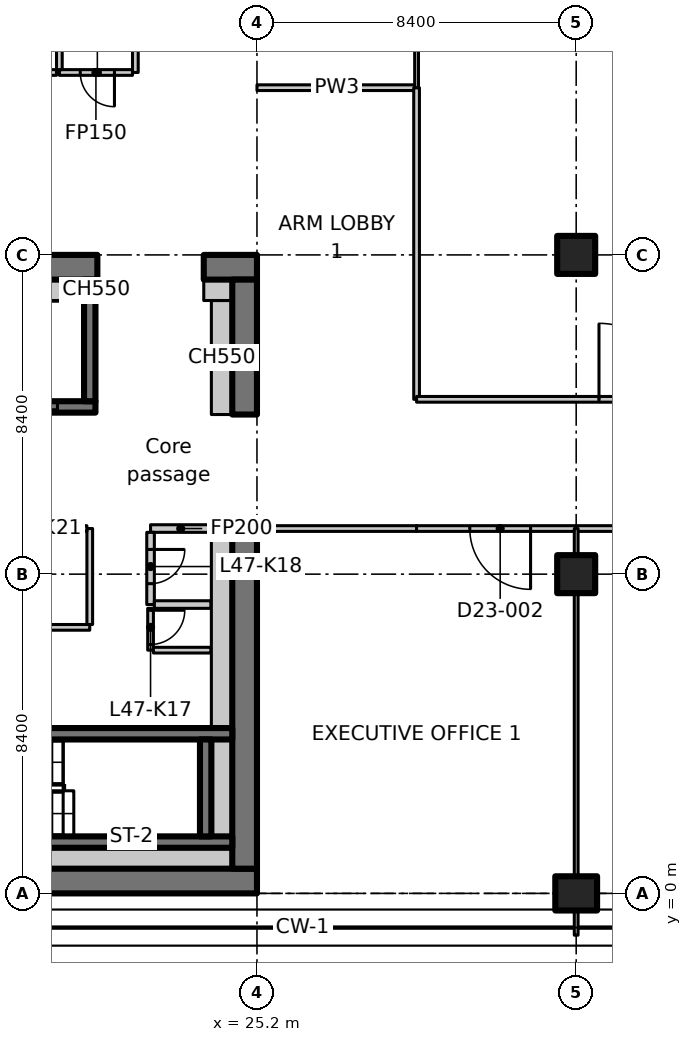
"""IFC4 building model, lengths in metres.
Left out: names, types, materials, properties, quantities, classifications, styles, units other than length and angle.
Written with IfcOpenShell. Run it as: python <this file> out.ifc"""

import sys

from ifc_helpers import new_model, si_unit, direction, frame, frame_2d, origin, origin_2d, place, context, subcontext, project, spatial, polyline, rectangle, outline, extrude, element, fill, save


model = new_model("IFC4")
c1 = context("Model", 3, precision=1e-05, world=origin(), true_north=direction((0.0, 1.0)))
c2 = subcontext(c1, "Body", "Model", "MODEL_VIEW")
j1 = project(units=[si_unit("LENGTHUNIT", "METRE"), si_unit("PLANEANGLEUNIT", "RADIAN")], contexts=[c1])
p1 = place(None, origin())
s1 = spatial("IfcSite", under=j1, at=p1, CompositionType="ELEMENT")
p2 = place(p1, origin())
s2 = spatial("IfcBuilding", under=s1, at=p2, CompositionType="ELEMENT")
p3 = place(p2, frame((0.0, 0.0, 188.4)))
s3 = spatial("IfcBuildingStorey", under=s2, at=p3, CompositionType="ELEMENT", Elevation=188.4)
p4 = place(p3, frame((33.6, 0.0, 0.0), z_axis=(0.0, 0.0, 1.0), x_axis=(0.0, 1.0, 0.0)))
e1 = element("IfcColumn", 1, at=p4, inside=s3, PredefinedType="COLUMN", context=c2, shape_type="SweptSolid", body=[
    extrude(rectangle(XDim=0.9, YDim=1.1, at=origin_2d()), origin(), (0.0, 0.0, 1.0), 3.35),
])
for number, where, z_axis, x_axis in (
    (2, (33.6, 8.4, 0.0), (0.0, 0.0, 1.0), (1.0, 0.0, 0.0)),
    (3, (33.6, 16.8, 0.0), (0.0, 0.0, 1.0), (1.0, 0.0, 0.0)),
):
    element("IfcColumn", number, at=place(p3, frame(where, z_axis=z_axis, x_axis=x_axis)), inside=s3, PredefinedType="COLUMN", context=c2, shape_type="SweptSolid", body=[
        extrude(rectangle(XDim=1.0, YDim=1.0, at=origin_2d()), origin(), (0.0, 0.0, 1.0), 3.35),
    ])
p5 = place(p3, frame((7.286, 0.325, 0.0), z_axis=(0.0, 0.0, 1.0), x_axis=(1.0, 0.0, 0.0)))
e4 = element("IfcWall", 4, at=p5, inside=s3, PredefinedType="SHEAR", context=c2, shape_type="SweptSolid", body=[
    extrude(rectangle(XDim=17.914, YDim=0.65, at=frame_2d((8.957, 0.0))), origin(), (0.0, 0.0, 1.0), 3.35),
])
p6 = place(p3, frame((-1.1, 16.475, 0.0), z_axis=(0.0, 0.0, 1.0), x_axis=(1.0, 0.0, 0.0)))
e5 = element("IfcWall", 5, at=p6, inside=s3, PredefinedType="SHEAR", context=c2, shape_type="SweptSolid", body=[
    extrude(rectangle(XDim=22.1, YDim=0.65, at=frame_2d((11.05, 0.0))), origin(), (0.0, 0.0, 1.0), 3.35),
])
p7 = place(p6, frame((3.15, 0.0, 0.0)))
e6 = element("IfcOpeningElement", 6, at=p7, cuts=e5, PredefinedType="OPENING", context=c2, shape_type="SweptSolid", body=[
    extrude(rectangle(XDim=1.1, YDim=2.3, at=frame_2d((0.55, 1.15))), frame((0.0, 0.335, 0.0), z_axis=(0.0, -1.0, 0.0), x_axis=(1.0, 0.0, 0.0)), (0.0, 0.0, 1.0), 0.67),
])
p8 = place(p3, frame((23.8, 16.475, 0.0), z_axis=(0.0, 0.0, 1.0), x_axis=(1.0, 0.0, 0.0)))
e7 = element("IfcWall", 7, at=p8, inside=s3, PredefinedType="SHEAR", context=c2, shape_type="SweptSolid", body=[
    extrude(rectangle(XDim=1.4, YDim=0.65, at=frame_2d((0.7, 0.0))), origin(), (0.0, 0.0, 1.0), 3.35),
])
p9 = place(p3, frame((24.875, 0.65, 0.0), z_axis=(0.0, 0.0, 1.0), x_axis=(0.0, 1.0, 0.0)))
e8 = element("IfcWall", 8, at=p9, inside=s3, PredefinedType="SHEAR", context=c2, shape_type="SweptSolid", body=[
    extrude(rectangle(XDim=9.15, YDim=0.65, at=frame_2d((4.575, 0.0))), origin(), (0.0, 0.0, 1.0), 3.35),
])
p10 = place(p3, frame((24.875, 12.6, 0.0), z_axis=(0.0, 0.0, 1.0), x_axis=(0.0, 1.0, 0.0)))
e9 = element("IfcWall", 9, at=p10, inside=s3, PredefinedType="SHEAR", context=c2, shape_type="SweptSolid", body=[
    extrude(rectangle(XDim=3.55, YDim=0.65, at=frame_2d((1.775, 0.0))), origin(), (0.0, 0.0, 1.0), 3.35),
])
p11 = place(p3, frame((24.275, 12.6, 0.0), z_axis=(0.0, 0.0, 1.0), x_axis=(0.0, 1.0, 0.0)))
e10 = element("IfcWall", 10, at=p11, inside=s3, PredefinedType="PARTITIONING", context=c2, shape_type="SweptSolid", body=[
    extrude(rectangle(XDim=3.0, YDim=0.55, at=frame_2d((1.5, 0.0))), origin(), (0.0, 0.0, 1.0), 3.35),
])
p12 = place(p3, frame((23.8, 15.875, 0.0), z_axis=(0.0, 0.0, 1.0), x_axis=(1.0, 0.0, 0.0)))
e11 = element("IfcWall", 11, at=p12, inside=s3, PredefinedType="PARTITIONING", context=c2, shape_type="SweptSolid", body=[
    extrude(rectangle(XDim=0.75, YDim=0.55, at=frame_2d((0.375, 0.0))), origin(), (0.0, 0.0, 1.0), 3.35),
])
p13 = place(p3, frame((17.85, 12.8, 0.0), z_axis=(0.0, 0.0, 1.0), x_axis=(1.0, 0.0, 0.0)))
e12 = element("IfcWall", 12, at=p13, inside=s3, PredefinedType="SHEAR", context=c2, shape_type="SweptSolid", body=[
    extrude(rectangle(XDim=3.1, YDim=0.3, at=frame_2d((1.55, 0.0))), origin(), (0.0, 0.0, 1.0), 3.35),
])
p14 = place(p13, frame((1.0, 0.0, 0.0)))
e13 = element("IfcOpeningElement", 13, at=p14, cuts=e12, PredefinedType="OPENING", context=c2, shape_type="SweptSolid", body=[
    extrude(rectangle(XDim=1.1, YDim=2.3, at=frame_2d((0.55, 1.15))), frame((0.0, 0.16, 0.0), z_axis=(0.0, -1.0, 0.0), x_axis=(1.0, 0.0, 0.0)), (0.0, 0.0, 1.0), 0.32),
])
p15 = place(p3, frame((20.8, 12.95, 0.0), z_axis=(0.0, 0.0, 1.0), x_axis=(0.0, 1.0, 0.0)))
e14 = element("IfcWall", 14, at=p15, inside=s3, PredefinedType="SHEAR", context=c2, shape_type="SweptSolid", body=[
    extrude(rectangle(XDim=3.2, YDim=0.3, at=frame_2d((1.6, 0.0))), origin(), (0.0, 0.0, 1.0), 3.35),
])
p16 = place(p3, frame((15.8, 1.35, 0.0), z_axis=(0.0, 0.0, 1.0), x_axis=(1.0, 0.0, 0.0)))
e15 = element("IfcWall", 15, at=p16, inside=s3, PredefinedType="SHEAR", context=c2, shape_type="SweptSolid", body=[
    extrude(rectangle(XDim=8.75, YDim=0.3, at=frame_2d((4.375, 0.0))), origin(), (0.0, 0.0, 1.0), 3.35),
])
p17 = place(p3, frame((15.8, 4.2, 0.0), z_axis=(0.0, 0.0, 1.0), x_axis=(1.0, 0.0, 0.0)))
e16 = element("IfcWall", 16, at=p17, inside=s3, PredefinedType="SHEAR", context=c2, shape_type="SweptSolid", body=[
    extrude(rectangle(XDim=8.75, YDim=0.3, at=frame_2d((4.375, 0.0))), origin(), (0.0, 0.0, 1.0), 3.35),
])
p18 = place(p17, frame((0.4, 0.0, 0.0)))
e17 = element("IfcOpeningElement", 17, at=p18, cuts=e16, PredefinedType="OPENING", context=c2, shape_type="SweptSolid", body=[
    extrude(rectangle(XDim=1.0, YDim=2.1, at=frame_2d((0.5, 1.05))), frame((0.0, 0.16, 0.0), z_axis=(0.0, -1.0, 0.0), x_axis=(1.0, 0.0, 0.0)), (0.0, 0.0, 1.0), 0.32),
])
p19 = place(p3, frame((23.85, 1.5, 0.0), z_axis=(0.0, 0.0, 1.0), x_axis=(0.0, 1.0, 0.0)))
e18 = element("IfcWall", 18, at=p19, inside=s3, PredefinedType="SHEAR", context=c2, shape_type="SweptSolid", body=[
    extrude(rectangle(XDim=2.55, YDim=0.3, at=frame_2d((1.275, 0.0))), origin(), (0.0, 0.0, 1.0), 3.35),
])
p20 = place(p3, frame((23.988, 9.6, 0.0), z_axis=(0.0, 0.0, 1.0), x_axis=(-1.0, 0.0, 0.0)))
e19 = element("IfcWall", 19, at=p20, inside=s3, PredefinedType="PARTITIONING", context=c2, shape_type="SweptSolid", body=[
    extrude(rectangle(XDim=1.588, YDim=0.2, at=frame_2d((0.794, 0.0))), origin(), (0.0, 0.0, 1.0), 3.35),
])
p21 = place(p3, frame((22.4, 9.5, 0.0), z_axis=(0.0, 0.0, 1.0), x_axis=(0.0, -1.0, 0.0)))
e20 = element("IfcWall", 20, at=p21, inside=s3, PredefinedType="PARTITIONING", context=c2, shape_type="SweptSolid", body=[
    extrude(rectangle(XDim=1.9, YDim=0.2, at=frame_2d((0.95, 0.0))), origin(), (0.0, 0.0, 1.0), 3.35),
])
p22 = place(p21, frame((0.45, 0.0, 0.0)))
e21 = element("IfcOpeningElement", 21, at=p22, cuts=e20, PredefinedType="OPENING", context=c2, shape_type="SweptSolid", body=[
    extrude(rectangle(XDim=0.9, YDim=2.1, at=frame_2d((0.45, 1.05))), frame((0.0, 0.11, 0.0), z_axis=(0.0, -1.0, 0.0), x_axis=(1.0, 0.0, 0.0)), (0.0, 0.0, 1.0), 0.22),
])
p23 = place(p3, frame((22.5, 7.6, 0.0), z_axis=(0.0, 0.0, 1.0), x_axis=(1.0, 0.0, 0.0)))
e22 = element("IfcWall", 22, at=p23, inside=s3, PredefinedType="PARTITIONING", context=c2, shape_type="SweptSolid", body=[
    extrude(rectangle(XDim=1.488, YDim=0.2, at=frame_2d((0.744, 0.0))), origin(), (0.0, 0.0, 1.0), 3.35),
])
p24 = place(p3, frame((12.5, 7.0, 0.0), z_axis=(0.0, 0.0, 1.0), x_axis=(1.0, 0.0, 0.0)))
e23 = element("IfcWall", 23, at=p24, inside=s3, PredefinedType="PARTITIONING", context=c2, shape_type="SweptSolid", body=[
    extrude(rectangle(XDim=8.3, YDim=0.15, at=frame_2d((4.15, 0.0))), origin(), (0.0, 0.0, 1.0), 3.35),
])
p25 = place(p3, frame((20.8, 7.075, 0.0), z_axis=(0.0, 0.0, 1.0), x_axis=(0.0, 1.0, 0.0)))
e24 = element("IfcWall", 24, at=p25, inside=s3, PredefinedType="PARTITIONING", context=c2, shape_type="SweptSolid", body=[
    extrude(rectangle(XDim=2.525, YDim=0.15, at=frame_2d((1.263, 0.0))), origin(), (0.0, 0.0, 1.0), 3.35),
])
p26 = place(p3, frame((20.725, 9.6, 0.0), z_axis=(0.0, 0.0, 1.0), x_axis=(-1.0, 0.0, 0.0)))
e25 = element("IfcWall", 25, at=p26, inside=s3, PredefinedType="PARTITIONING", context=c2, shape_type="SweptSolid", body=[
    extrude(rectangle(XDim=8.225, YDim=0.15, at=frame_2d((4.113, 0.0))), origin(), (0.0, 0.0, 1.0), 3.35),
])
p27 = place(p26, frame((3.675, 0.0, 0.0)))
e26 = element("IfcOpeningElement", 26, at=p27, cuts=e25, PredefinedType="OPENING", context=c2, shape_type="SweptSolid", body=[
    extrude(rectangle(XDim=0.9, YDim=2.1, at=frame_2d((0.45, 1.05))), frame((0.0, 0.085, 0.0), z_axis=(0.0, -1.0, 0.0), x_axis=(1.0, 0.0, 0.0)), (0.0, 0.0, 1.0), 0.17),
])
p28 = place(p3, frame((22.0, 23.925, 0.0), z_axis=(0.0, 0.0, 1.0), x_axis=(0.0, -1.0, 0.0)))
e27 = element("IfcWall", 27, at=p28, inside=s3, PredefinedType="PARTITIONING", context=c2, shape_type="SweptSolid", body=[
    extrude(rectangle(XDim=2.325, YDim=0.15, at=frame_2d((1.163, 0.0))), origin(), (0.0, 0.0, 1.0), 3.35),
])
p29 = place(p3, frame((21.925, 21.6, 0.0), z_axis=(0.0, 0.0, 1.0), x_axis=(-1.0, 0.0, 0.0)))
e28 = element("IfcWall", 28, at=p29, inside=s3, PredefinedType="PARTITIONING", context=c2, shape_type="SweptSolid", body=[
    extrude(rectangle(XDim=1.925, YDim=0.15, at=frame_2d((0.962, 0.0))), origin(), (0.0, 0.0, 1.0), 3.35),
])
p30 = place(p29, frame((0.475, 0.0, 0.0)))
e29 = element("IfcOpeningElement", 29, at=p30, cuts=e28, PredefinedType="OPENING", context=c2, shape_type="SweptSolid", body=[
    extrude(rectangle(XDim=0.9, YDim=2.1, at=frame_2d((0.45, 1.05))), frame((0.0, 0.085, 0.0), z_axis=(0.0, -1.0, 0.0), x_axis=(1.0, 0.0, 0.0)), (0.0, 0.0, 1.0), 0.17),
])
p31 = place(p3, frame((20.0, 21.675, 0.0), z_axis=(0.0, 0.0, 1.0), x_axis=(0.0, 1.0, 0.0)))
e30 = element("IfcWall", 30, at=p31, inside=s3, PredefinedType="PARTITIONING", context=c2, shape_type="SweptSolid", body=[
    extrude(rectangle(XDim=2.25, YDim=0.15, at=frame_2d((1.125, 0.0))), origin(), (0.0, 0.0, 1.0), 3.35),
])
p32 = place(p3, frame((19.925, 21.6, 0.0), z_axis=(0.0, 0.0, 1.0), x_axis=(-1.0, 0.0, 0.0)))
e31 = element("IfcWall", 31, at=p32, inside=s3, PredefinedType="PARTITIONING", context=c2, shape_type="SweptSolid", body=[
    extrude(rectangle(XDim=2.325, YDim=0.15, at=frame_2d((1.163, 0.0))), origin(), (0.0, 0.0, 1.0), 3.35),
])
p33 = place(p32, frame((0.675, 0.0, 0.0)))
e32 = element("IfcOpeningElement", 32, at=p33, cuts=e31, PredefinedType="OPENING", context=c2, shape_type="SweptSolid", body=[
    extrude(rectangle(XDim=0.9, YDim=2.1, at=frame_2d((0.45, 1.05))), frame((0.0, 0.085, 0.0), z_axis=(0.0, -1.0, 0.0), x_axis=(1.0, 0.0, 0.0)), (0.0, 0.0, 1.0), 0.17),
])
p34 = place(p3, frame((22.4, 7.5, 0.0), z_axis=(0.0, 0.0, 1.0), x_axis=(0.0, -1.0, 0.0)))
e33 = element("IfcWall", 33, at=p34, inside=s3, PredefinedType="PARTITIONING", context=c2, shape_type="SweptSolid", body=[
    extrude(rectangle(XDim=1.1, YDim=0.15, at=frame_2d((0.55, 0.0))), origin(), (0.0, 0.0, 1.0), 3.35),
])
p35 = place(p34, frame((0.05, 0.0, 0.0)))
e34 = element("IfcOpeningElement", 34, at=p35, cuts=e33, PredefinedType="OPENING", context=c2, shape_type="SweptSolid", body=[
    extrude(rectangle(XDim=0.9, YDim=2.1, at=frame_2d((0.45, 1.05))), frame((0.0, 0.085, 0.0), z_axis=(0.0, -1.0, 0.0), x_axis=(1.0, 0.0, 0.0)), (0.0, 0.0, 1.0), 0.17),
])
p36 = place(p3, frame((22.475, 6.4, 0.0), z_axis=(0.0, 0.0, 1.0), x_axis=(1.0, 0.0, 0.0)))
e35 = element("IfcWall", 35, at=p36, inside=s3, PredefinedType="PARTITIONING", context=c2, shape_type="SweptSolid", body=[
    extrude(rectangle(XDim=1.513, YDim=0.15, at=frame_2d((0.756, 0.0))), origin(), (0.0, 0.0, 1.0), 3.35),
])
p37 = place(p3, frame((18.15, 15.875, 0.0), z_axis=(0.0, 0.0, 1.0), x_axis=(1.0, 0.0, 0.0)))
e36 = element("IfcWall", 36, at=p37, inside=s3, PredefinedType="PARTITIONING", context=c2, shape_type="SweptSolid", body=[
    extrude(rectangle(XDim=2.5, YDim=0.55, at=frame_2d((1.25, 0.0))), origin(), (0.0, 0.0, 1.0), 3.35),
])
p38 = place(p3, frame((20.95, 15.875, 0.0), z_axis=(0.0, 0.0, 1.0), x_axis=(1.0, 0.0, 0.0)))
e37 = element("IfcWall", 37, at=p38, inside=s3, PredefinedType="PARTITIONING", context=c2, shape_type="SweptSolid", body=[
    extrude(rectangle(XDim=0.05, YDim=0.55, at=frame_2d((0.025, 0.0))), origin(), (0.0, 0.0, 1.0), 3.35),
])
p39 = place(p3, frame((13.35, 0.925, 0.0), z_axis=(0.0, 0.0, 1.0), x_axis=(1.0, 0.0, 0.0)))
e38 = element("IfcWall", 38, at=p39, inside=s3, PredefinedType="PARTITIONING", context=c2, shape_type="SweptSolid", body=[
    extrude(rectangle(XDim=11.2, YDim=0.55, at=frame_2d((5.6, 0.0))), origin(), (0.0, 0.0, 1.0), 3.35),
])
p40 = place(p3, frame((24.275, 1.5, 0.0), z_axis=(0.0, 0.0, 1.0), x_axis=(0.0, 1.0, 0.0)))
e39 = element("IfcWall", 39, at=p40, inside=s3, PredefinedType="PARTITIONING", context=c2, shape_type="SweptSolid", body=[
    extrude(rectangle(XDim=2.55, YDim=0.55, at=frame_2d((1.275, 0.0))), origin(), (0.0, 0.0, 1.0), 3.35),
])
p41 = place(p3, frame((24.275, 4.35, 0.0), z_axis=(0.0, 0.0, 1.0), x_axis=(0.0, 1.0, 0.0)))
e40 = element("IfcWall", 40, at=p41, inside=s3, PredefinedType="PARTITIONING", context=c2, shape_type="SweptSolid", body=[
    extrude(rectangle(XDim=5.45, YDim=0.55, at=frame_2d((2.725, 0.0))), origin(), (0.0, 0.0, 1.0), 3.35),
])
for number, where, z_axis, x_axis in (
    (41, (25.2, 21.2, 0.0), (0.0, 0.0, 1.0), (1.0, 0.0, 0.0)),
    (42, (29.4, 9.6, 0.0), (0.0, 0.0, 1.0), (-1.0, 0.0, 0.0)),
):
    element("IfcWall", number, at=place(p3, frame(where, z_axis=z_axis, x_axis=x_axis)), inside=s3, PredefinedType="PARTITIONING", context=c2, shape_type="SweptSolid", body=[
        extrude(rectangle(XDim=4.2, YDim=0.15, at=frame_2d((2.1, 0.0))), origin(), (0.0, 0.0, 1.0), 3.33),
    ])
p42 = place(p3, frame((29.4, 21.2, 0.0), z_axis=(0.0, 0.0, 1.0), x_axis=(0.0, -1.0, 0.0)))
e43 = element("IfcWall", 43, at=p42, inside=s3, PredefinedType="PARTITIONING", context=c2, shape_type="SweptSolid", body=[
    extrude(rectangle(XDim=8.2, YDim=0.15, at=frame_2d((4.1, 0.0))), origin(), (0.0, 0.0, 1.0), 3.33),
])
p43 = place(p3, frame((29.4, 27.511, 0.0), z_axis=(0.0, 0.0, 1.0), x_axis=(0.0, -1.0, 0.0)))
e44 = element("IfcWall", 44, at=p43, inside=s3, PredefinedType="PARTITIONING", context=c2, shape_type="SweptSolid", body=[
    extrude(outline(polyline([(0.0, 0.0), (6.311, 0.0), (6.311, 3.33), (2.761, 3.33), (2.759, 2.98), (1.863, 2.98), (1.861, 3.33), (0.236, 3.33), (0.0, 3.33), (0.0, 0.0)])), frame((0.0, 0.05, 0.0), z_axis=(0.0, -1.0, 0.0), x_axis=(1.0, 0.0, 0.0)), (0.0, 0.0, 1.0), 0.1),
])
p44 = place(p3, frame((33.6, 9.6, 0.0), z_axis=(0.0, 0.0, 1.0), x_axis=(-1.0, 0.0, 0.0)))
e45 = element("IfcWall", 45, at=p44, inside=s3, PredefinedType="PARTITIONING", context=c2, shape_type="SweptSolid", body=[
    extrude(rectangle(XDim=4.2, YDim=0.15, at=frame_2d((2.1, 0.0))), origin(), (0.0, 0.0, 1.0), 3.33),
])
p45 = place(p44, frame((1.2, 0.0, 0.0)))
e46 = element("IfcOpeningElement", 46, at=p45, cuts=e45, PredefinedType="OPENING", context=c2, shape_type="SweptSolid", body=[
    extrude(rectangle(XDim=1.6, YDim=2.1, at=frame_2d((0.8, 1.05))), frame((0.0, 0.085, 0.0), z_axis=(0.0, -1.0, 0.0), x_axis=(1.0, 0.0, 0.0)), (0.0, 0.0, 1.0), 0.17),
])
p46 = place(p3, frame((42.0, 9.6, 0.0), z_axis=(0.0, 0.0, 1.0), x_axis=(-1.0, 0.0, 0.0)))
e47 = element("IfcWall", 47, at=p46, inside=s3, PredefinedType="PARTITIONING", context=c2, shape_type="SweptSolid", body=[
    extrude(rectangle(XDim=8.4, YDim=0.15, at=frame_2d((4.2, 0.0))), origin(), (0.0, 0.0, 1.0), 3.33),
])
p47 = place(p46, frame((3.3, 0.0, 0.0)))
e48 = element("IfcOpeningElement", 48, at=p47, cuts=e47, PredefinedType="OPENING", context=c2, shape_type="SweptSolid", body=[
    extrude(rectangle(XDim=1.6, YDim=2.1, at=frame_2d((0.8, 1.05))), frame((0.0, 0.085, 0.0), z_axis=(0.0, -1.0, 0.0), x_axis=(1.0, 0.0, 0.0)), (0.0, 0.0, 1.0), 0.17),
])
p48 = place(p3, frame((29.4, 13.0, 0.0), z_axis=(0.0, 0.0, 1.0), x_axis=(1.0, 0.0, 0.0)))
e49 = element("IfcWall", 49, at=p48, inside=s3, PredefinedType="PARTITIONING", context=c2, shape_type="SweptSolid", body=[
    extrude(rectangle(XDim=11.8, YDim=0.15, at=frame_2d((5.9, 0.0))), origin(), (0.0, 0.0, 1.0), 3.33),
])
p49 = place(p48, frame((4.8, 0.0, 0.0)))
e50 = element("IfcOpeningElement", 50, at=p49, cuts=e49, PredefinedType="OPENING", context=c2, shape_type="SweptSolid", body=[
    extrude(rectangle(XDim=2.0, YDim=2.4, at=frame_2d((1.0, 1.2))), frame((0.0, 0.085, 0.0), z_axis=(0.0, -1.0, 0.0), x_axis=(1.0, 0.0, 0.0)), (0.0, 0.0, 1.0), 0.17),
])
p50 = place(p3, frame((33.6, 9.6, 0.0), z_axis=(0.0, 0.0, 1.0), x_axis=(0.0, -1.0, 0.0)))
e51 = element("IfcWall", 51, at=p50, inside=s3, PredefinedType="PARTITIONING", context=c2, shape_type="SweptSolid", body=[
    extrude(rectangle(XDim=0.68, YDim=0.1, at=frame_2d((0.34, 0.0))), origin(), (0.0, 0.0, 1.0), 3.33),
])
p51 = place(p3, frame((33.6, 7.88, 0.0), z_axis=(0.0, 0.0, 1.0), x_axis=(0.0, -1.0, 0.0)))
e52 = element("IfcWall", 52, at=p51, inside=s3, PredefinedType="PARTITIONING", context=c2, shape_type="SweptSolid", body=[
    extrude(rectangle(XDim=7.41, YDim=0.1, at=frame_2d((3.705, 0.0))), origin(), (0.0, 0.0, 1.0), 3.33),
])
p52 = place(p3, frame((33.6, -0.47, 0.0), z_axis=(0.0, 0.0, 1.0), x_axis=(0.0, -1.0, 0.0)))
e53 = element("IfcWall", 53, at=p52, inside=s3, PredefinedType="PARTITIONING", context=c2, shape_type="SweptSolid", body=[
    extrude(rectangle(XDim=0.63, YDim=0.1, at=frame_2d((0.315, 0.0))), origin(), (0.0, 0.0, 1.0), 3.33),
])
p53 = place(p14, origin())
e54 = element("IfcDoor", 54, at=p53, inside=s3, OperationType="SLIDING_TO_LEFT", PredefinedType="DOOR", context=c2, shape_type="SweptSolid", body=[
    extrude(rectangle(XDim=1.1, YDim=2.3, at=frame_2d((0.55, 1.15))), frame((0.0, 0.025, 0.0), z_axis=(0.0, -1.0, 0.0), x_axis=(1.0, 0.0, 0.0)), (0.0, 0.0, 1.0), 0.05),
])
fill(e13, e54)
p54 = place(p35, origin())
e55 = element("IfcDoor", 55, at=p54, inside=s3, OperationType="SINGLE_SWING_LEFT", PredefinedType="DOOR", context=c2, shape_type="SweptSolid", body=[
    extrude(rectangle(XDim=0.9, YDim=2.1, at=frame_2d((0.45, 1.05))), frame((0.0, 0.025, 0.0), z_axis=(0.0, -1.0, 0.0), x_axis=(1.0, 0.0, 0.0)), (0.0, 0.0, 1.0), 0.05),
])
fill(e34, e55)
p55 = place(p22, origin())
e56 = element("IfcDoor", 56, at=p55, inside=s3, OperationType="SINGLE_SWING_RIGHT", PredefinedType="DOOR", context=c2, shape_type="SweptSolid", body=[
    extrude(rectangle(XDim=0.9, YDim=2.1, at=frame_2d((0.45, 1.05))), frame((0.0, 0.025, 0.0), z_axis=(0.0, -1.0, 0.0), x_axis=(1.0, 0.0, 0.0)), (0.0, 0.0, 1.0), 0.05),
])
fill(e21, e56)
p56 = place(p30, origin())
e57 = element("IfcDoor", 57, at=p56, inside=s3, OperationType="SINGLE_SWING_LEFT", PredefinedType="DOOR", context=c2, shape_type="SweptSolid", body=[
    extrude(rectangle(XDim=0.9, YDim=2.1, at=frame_2d((0.45, 1.05))), frame((0.0, 0.025, 0.0), z_axis=(0.0, -1.0, 0.0), x_axis=(1.0, 0.0, 0.0)), (0.0, 0.0, 1.0), 0.05),
])
fill(e29, e57)
p57 = place(p45, origin())
e58 = element("IfcDoor", 58, at=p57, inside=s3, OperationType="DOUBLE_DOOR_SINGLE_SWING", PredefinedType="DOOR", context=c2, shape_type="SweptSolid", body=[
    extrude(rectangle(XDim=1.6, YDim=2.1, at=frame_2d((0.8, 1.05))), frame((0.0, 0.025, 0.0), z_axis=(0.0, -1.0, 0.0), x_axis=(1.0, 0.0, 0.0)), (0.0, 0.0, 1.0), 0.05),
])
fill(e46, e58)
p58 = place(p49, origin())
e59 = element("IfcDoor", 59, at=p58, inside=s3, OperationType="DOUBLE_DOOR_SINGLE_SWING", PredefinedType="DOOR", context=c2, shape_type="SweptSolid", body=[
    extrude(rectangle(XDim=2.0, YDim=2.4, at=frame_2d((1.0, 1.2))), frame((0.0, 0.025, 0.0), z_axis=(0.0, -1.0, 0.0), x_axis=(1.0, 0.0, 0.0)), (0.0, 0.0, 1.0), 0.05),
])
fill(e50, e59)
save(model, sys.argv[1])
